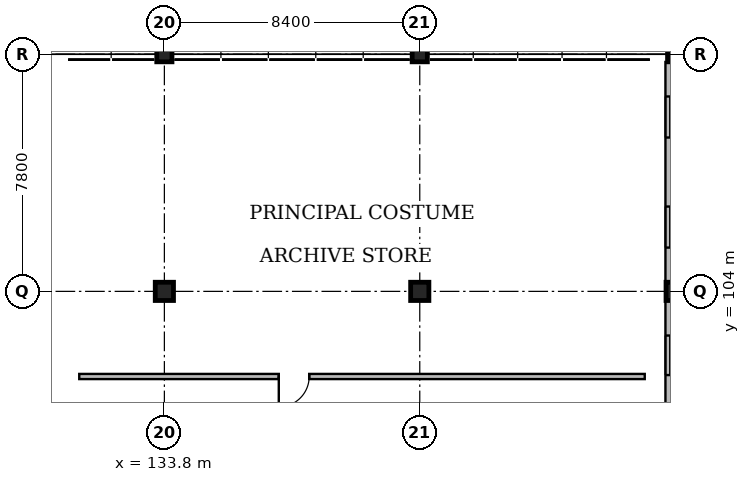
"""IFC4 building model, lengths in metres.
Left out: names, types, materials, properties, quantities, classifications, styles, units other than length and angle.
Written with IfcOpenShell. Run it as: python <this file> out.ifc"""

import sys

from ifc_helpers import new_model, si_unit, direction, frame, frame_2d, origin, origin_2d, place, context, subcontext, project, spatial, rectangle, extrude, element, fill, save


model = new_model("IFC4")
c1 = context("Model", 3, precision=1e-05, world=origin(), true_north=direction((0.0, 1.0)))
c2 = subcontext(c1, "Body", "Model", "MODEL_VIEW")
j1 = project(units=[si_unit("LENGTHUNIT", "METRE"), si_unit("PLANEANGLEUNIT", "RADIAN")], contexts=[c1])
p1 = place(None, origin())
s1 = spatial("IfcSite", under=j1, at=p1, CompositionType="ELEMENT")
p2 = place(p1, origin())
s2 = spatial("IfcBuilding", under=s1, at=p2, CompositionType="ELEMENT")
p3 = place(p2, frame((0.0, 0.0, 9.0)))
s3 = spatial("IfcBuildingStorey", under=s2, at=p3, CompositionType="ELEMENT", Elevation=9.0)
p4 = place(p3, frame((133.8, 104.0, 0.0), z_axis=(0.0, 0.0, 1.0), x_axis=(1.0, 0.0, 0.0)))
e1 = element("IfcColumn", 1, at=p4, inside=s3, PredefinedType="COLUMN", context=c2, shape_type="SweptSolid", body=[
    extrude(rectangle(XDim=0.6, YDim=0.6, at=origin_2d()), origin(), (0.0, 0.0, 1.0), 4.2),
])
p5 = place(p3, frame((133.8, 111.8, 0.0), z_axis=(0.0, 0.0, 1.0), x_axis=(1.0, 0.0, 0.0)))
e2 = element("IfcColumn", 2, at=p5, inside=s3, PredefinedType="COLUMN", context=c2, shape_type="SweptSolid", body=[
    extrude(rectangle(XDim=0.5, YDim=0.5, at=origin_2d()), origin(), (0.0, 0.0, 1.0), 4.2),
])
p6 = place(p3, frame((142.2, 104.0, 0.0), z_axis=(0.0, 0.0, 1.0), x_axis=(1.0, 0.0, 0.0)))
e3 = element("IfcColumn", 3, at=p6, inside=s3, PredefinedType="COLUMN", context=c2, shape_type="SweptSolid", body=[
    extrude(rectangle(XDim=0.6, YDim=0.6, at=origin_2d()), origin(), (0.0, 0.0, 1.0), 4.2),
])
p7 = place(p3, frame((142.2, 111.8, 0.0), z_axis=(0.0, 0.0, 1.0), x_axis=(1.0, 0.0, 0.0)))
e4 = element("IfcColumn", 4, at=p7, inside=s3, PredefinedType="COLUMN", context=c2, shape_type="SweptSolid", body=[
    extrude(rectangle(XDim=0.5, YDim=0.5, at=origin_2d()), origin(), (0.0, 0.0, 1.0), 4.2),
])
p8 = place(p3, frame((150.6, 104.0, 0.0), z_axis=(0.0, 0.0, 1.0), x_axis=(1.0, 0.0, 0.0)))
e5 = element("IfcColumn", 5, at=p8, inside=s3, PredefinedType="COLUMN", context=c2, shape_type="SweptSolid", body=[
    extrude(rectangle(XDim=0.6, YDim=0.6, at=origin_2d()), origin(), (0.0, 0.0, 1.0), 4.2),
])
p9 = place(p3, frame((150.6, 111.8, 0.0), z_axis=(0.0, 0.0, 1.0), x_axis=(1.0, 0.0, 0.0)))
e6 = element("IfcColumn", 6, at=p9, inside=s3, PredefinedType="COLUMN", context=c2, shape_type="SweptSolid", body=[
    extrude(rectangle(XDim=0.5, YDim=0.5, at=origin_2d()), origin(), (0.0, 0.0, 1.0), 4.2),
])
p10 = place(p3, frame((150.42, 96.505, 0.0), z_axis=(0.0, 0.0, 1.0), x_axis=(0.0, 1.0, 0.0)))
e7 = element("IfcWall", 7, at=p10, inside=s3, PredefinedType="SOLIDWALL", context=c2, shape_type="SweptSolid", body=[
    extrude(rectangle(XDim=7.19, YDim=0.28, at=frame_2d((3.595, 0.0))), origin(), (0.0, 0.0, 1.0), 3.673),
])
p11 = place(p10, frame((1.147, 0.0, 0.95)))
e8 = element("IfcOpeningElement", 8, at=p11, cuts=e7, PredefinedType="OPENING", context=c2, shape_type="SweptSolid", body=[
    extrude(rectangle(XDim=1.3, YDim=1.65, at=frame_2d((0.65, 0.825))), frame((0.0, 0.16, 0.0), z_axis=(0.0, -1.0, 0.0), x_axis=(1.0, 0.0, 0.0)), (0.0, 0.0, 1.0), 0.32),
])
p12 = place(p10, frame((4.742, 0.0, 0.95)))
e9 = element("IfcOpeningElement", 9, at=p12, cuts=e7, PredefinedType="OPENING", context=c2, shape_type="SweptSolid", body=[
    extrude(rectangle(XDim=1.3, YDim=1.65, at=frame_2d((0.65, 0.825))), frame((0.0, 0.16, 0.0), z_axis=(0.0, -1.0, 0.0), x_axis=(1.0, 0.0, 0.0)), (0.0, 0.0, 1.0), 0.32),
])
p13 = place(p3, frame((150.42, 104.305, 0.0), z_axis=(0.0, 0.0, 1.0), x_axis=(0.0, 1.0, 0.0)))
e10 = element("IfcWall", 10, at=p13, inside=s3, PredefinedType="SOLIDWALL", context=c2, shape_type="SweptSolid", body=[
    extrude(rectangle(XDim=7.24, YDim=0.28, at=frame_2d((3.62, 0.0))), origin(), (0.0, 0.0, 1.0), 3.673),
])
p14 = place(p13, frame((1.135, 0.0, 0.95)))
e11 = element("IfcOpeningElement", 11, at=p14, cuts=e10, PredefinedType="OPENING", context=c2, shape_type="SweptSolid", body=[
    extrude(rectangle(XDim=1.35, YDim=1.7, at=frame_2d((0.675, 0.85))), frame((0.0, 0.16, 0.0), z_axis=(0.0, -1.0, 0.0), x_axis=(1.0, 0.0, 0.0)), (0.0, 0.0, 1.0), 0.32),
])
p15 = place(p13, frame((4.755, 0.0, 0.95)))
e12 = element("IfcOpeningElement", 12, at=p15, cuts=e10, PredefinedType="OPENING", context=c2, shape_type="SweptSolid", body=[
    extrude(rectangle(XDim=1.35, YDim=1.7, at=frame_2d((0.675, 0.85))), frame((0.0, 0.16, 0.0), z_axis=(0.0, -1.0, 0.0), x_axis=(1.0, 0.0, 0.0)), (0.0, 0.0, 1.0), 0.32),
])
p16 = place(p3, frame((149.6, 101.2, 0.0), z_axis=(0.0, 0.0, 1.0), x_axis=(-1.0, 0.0, 0.0)))
e13 = element("IfcWall", 13, at=p16, inside=s3, PredefinedType="PARTITIONING", context=c2, shape_type="SweptSolid", body=[
    extrude(rectangle(XDim=18.6, YDim=0.17, at=frame_2d((9.3, 0.0))), origin(), (0.0, 0.0, 1.0), 3.93),
])
p17 = place(p16, frame((11.037, 0.0, 0.0)))
e14 = element("IfcOpeningElement", 14, at=p17, cuts=e13, PredefinedType="OPENING", context=c2, shape_type="SweptSolid", body=[
    extrude(rectangle(XDim=1.0, YDim=2.2, at=frame_2d((0.5, 1.1))), frame((0.0, 0.105, 0.0), z_axis=(0.0, -1.0, 0.0), x_axis=(1.0, 0.0, 0.0)), (0.0, 0.0, 1.0), 0.21),
])
p18 = place(p12, origin())
e15 = element("IfcWindow", 15, at=p18, inside=s3, PartitioningType="SINGLE_PANEL", PredefinedType="WINDOW", context=c2, shape_type="SweptSolid", body=[
    extrude(rectangle(XDim=1.3, YDim=1.65, at=frame_2d((0.65, 0.825))), frame((0.0, 0.03, 0.0), z_axis=(0.0, -1.0, 0.0), x_axis=(1.0, 0.0, 0.0)), (0.0, 0.0, 1.0), 0.06),
])
fill(e9, e15)
p19 = place(p14, origin())
e16 = element("IfcWindow", 16, at=p19, inside=s3, PartitioningType="SINGLE_PANEL", PredefinedType="WINDOW", context=c2, shape_type="SweptSolid", body=[
    extrude(rectangle(XDim=1.35, YDim=1.7, at=frame_2d((0.675, 0.85))), frame((0.0, 0.03, 0.0), z_axis=(0.0, -1.0, 0.0), x_axis=(1.0, 0.0, 0.0)), (0.0, 0.0, 1.0), 0.06),
])
fill(e11, e16)
p20 = place(p15, origin())
e17 = element("IfcWindow", 17, at=p20, inside=s3, PartitioningType="SINGLE_PANEL", PredefinedType="WINDOW", context=c2, shape_type="SweptSolid", body=[
    extrude(rectangle(XDim=1.35, YDim=1.7, at=frame_2d((0.675, 0.85))), frame((0.0, 0.03, 0.0), z_axis=(0.0, -1.0, 0.0), x_axis=(1.0, 0.0, 0.0)), (0.0, 0.0, 1.0), 0.06),
])
fill(e12, e17)
p21 = place(p17, origin())
e18 = element("IfcDoor", 18, at=p21, inside=s3, OperationType="SINGLE_SWING_RIGHT", PredefinedType="DOOR", context=c2, shape_type="SweptSolid", body=[
    extrude(rectangle(XDim=1.0, YDim=2.2, at=frame_2d((0.5, 1.1))), frame((0.0, 0.025, 0.0), z_axis=(0.0, -1.0, 0.0), x_axis=(1.0, 0.0, 0.0)), (0.0, 0.0, 1.0), 0.05),
])
fill(e14, e18)
save(model, sys.argv[1])
